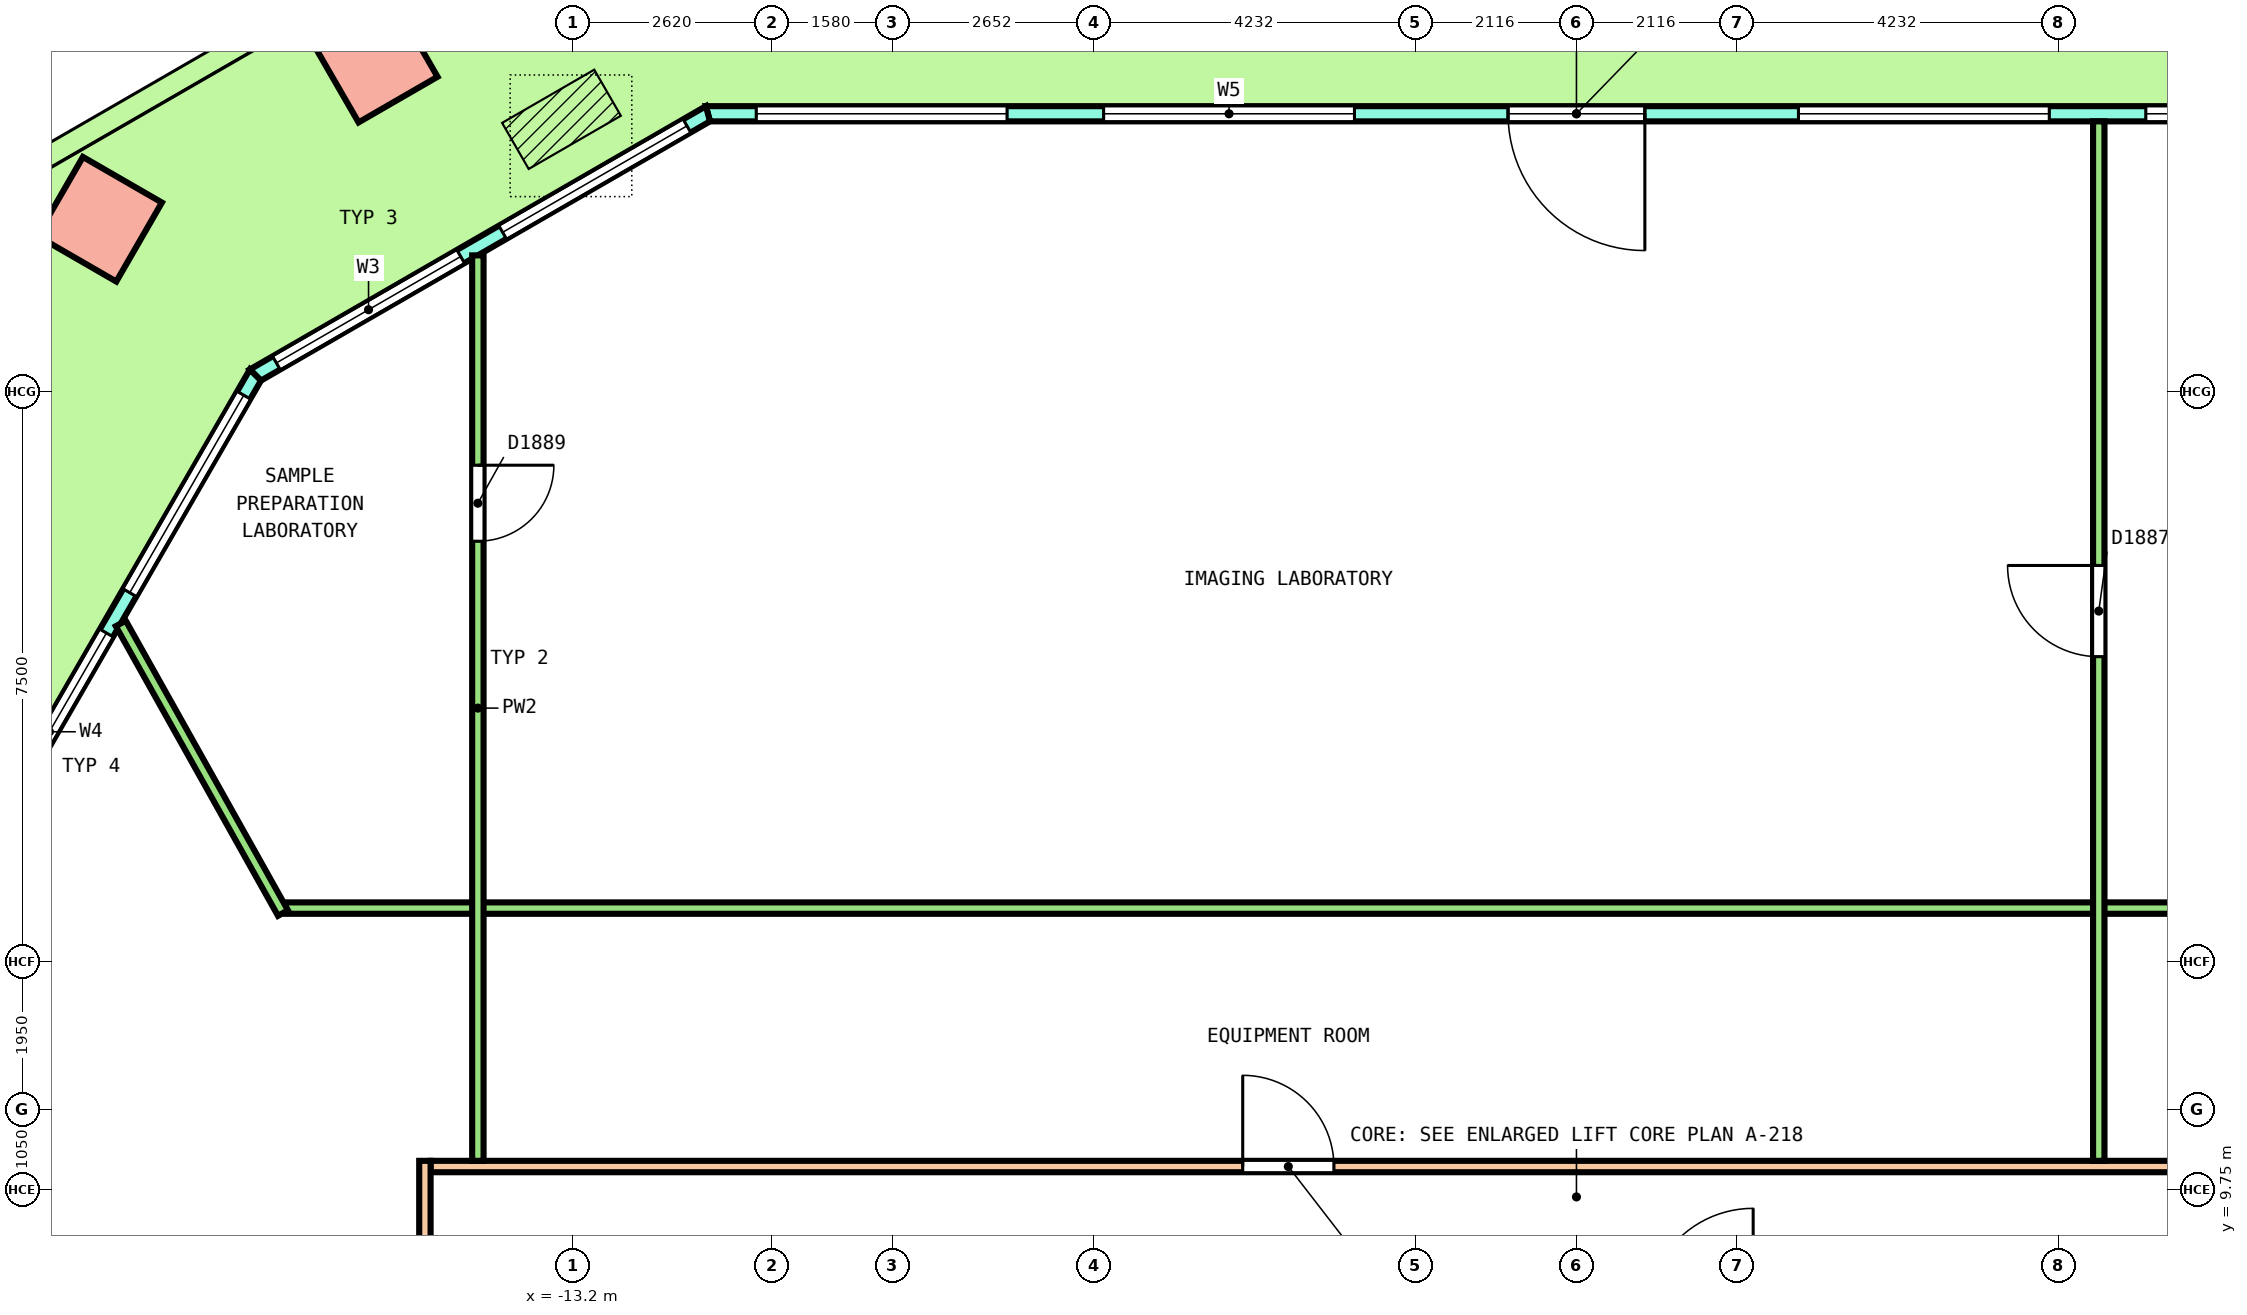
"""IFC4 building model, lengths in metres.
Left out: names, types, materials, properties, quantities, classifications, styles, units other than length and angle.
Written with IfcOpenShell. Run it as: python <this file> out.ifc"""

import sys

from ifc_helpers import new_model, si_unit, direction, frame, frame_2d, origin, origin_2d, place, context, subcontext, project, spatial, polyline, rectangle, outline, extrude, element, fill, save


model = new_model("IFC4")
c1 = context("Model", 3, precision=1e-05, world=origin(), true_north=direction((0.0, 1.0)))
c2 = subcontext(c1, "Body", "Model", "MODEL_VIEW")
j1 = project(units=[si_unit("LENGTHUNIT", "METRE"), si_unit("PLANEANGLEUNIT", "RADIAN")], contexts=[c1])
p1 = place(None, origin())
s1 = spatial("IfcSite", under=j1, at=p1, CompositionType="ELEMENT")
p2 = place(p1, origin())
s2 = spatial("IfcBuilding", under=s1, at=p2, CompositionType="ELEMENT")
p3 = place(p2, frame((0.0, 0.0, 189.2)))
s3 = spatial("IfcBuildingStorey", under=s2, at=p3, CompositionType="ELEMENT", Elevation=189.2)
for number, where, z_axis, x_axis in (
    (1, (-15.803, 24.606, 0.0), (0.0, 0.0, 1.0), (-0.866, -0.5, 0.0)),
    (2, (-19.43, 22.512, 0.0), (0.0, 0.0, 1.0), (-0.5, -0.866, 0.0)),
):
    element("IfcColumn", number, at=place(p3, frame(where, z_axis=z_axis, x_axis=x_axis)), inside=s3, PredefinedType="COLUMN", context=c2, shape_type="SweptSolid", body=[
        extrude(rectangle(XDim=1.2, YDim=1.2, at=origin_2d()), origin(), (0.0, 0.0, 1.0), 4.05),
    ])
p4 = place(p3, frame((11.426, 23.9, 0.0), z_axis=(0.0, 0.0, 1.0), x_axis=(-1.0, 0.0, 0.0)))
e3 = element("IfcWall", 3, at=p4, inside=s3, PredefinedType="SOLIDWALL", context=c2, shape_type="SweptSolid", body=[
    extrude(outline(polyline([(-0.027, -0.1), (1.014, -0.1), (2.055, -0.1), (3.097, -0.1), (4.138, -0.1), (5.179, -0.1), (6.22, -0.1), (7.261, -0.1), (8.303, -0.1), (9.344, -0.1), (10.385, -0.1), (11.426, -0.1), (12.468, -0.1), (13.509, -0.1), (14.55, -0.1), (15.591, -0.1), (16.632, -0.1), (17.673, -0.1), (18.715, -0.1), (19.756, -0.1), (20.797, -0.1), (21.838, -0.1), (22.879, -0.1), (22.826, 0.1), (21.789, 0.1), (20.753, 0.1), (19.717, 0.1), (18.68, 0.1), (17.644, 0.1), (16.608, 0.1), (15.572, 0.1), (14.535, 0.1), (13.499, 0.1), (12.463, 0.1), (11.426, 0.1), (10.39, 0.1), (9.354, 0.1), (8.317, 0.1), (7.281, 0.1), (6.245, 0.1), (5.208, 0.1), (4.172, 0.1), (3.136, 0.1), (2.099, 0.1), (1.063, 0.1), (0.027, 0.1), (-0.027, -0.1)])), origin(), (0.0, 0.0, 1.0), 4.1),
])
p5 = place(p4, frame((0.635, 0.0, 0.1)))
e4 = element("IfcOpeningElement", 4, at=p5, cuts=e3, PredefinedType="OPENING", context=c2, shape_type="SweptSolid", body=[
    extrude(rectangle(XDim=3.3, YDim=2.9, at=frame_2d((1.65, 1.45))), frame((0.0, 0.11, 0.0), z_axis=(0.0, -1.0, 0.0), x_axis=(1.0, 0.0, 0.0)), (0.0, 0.0, 1.0), 0.22),
])
p6 = place(p4, frame((5.206, 0.0, 0.1)))
e5 = element("IfcOpeningElement", 5, at=p6, cuts=e3, PredefinedType="OPENING", context=c2, shape_type="SweptSolid", body=[
    extrude(rectangle(XDim=3.3, YDim=2.9, at=frame_2d((1.65, 1.45))), frame((0.0, 0.11, 0.0), z_axis=(0.0, -1.0, 0.0), x_axis=(1.0, 0.0, 0.0)), (0.0, 0.0, 1.0), 0.22),
])
p7 = place(p4, frame((10.526, 0.0, 0.0)))
e6 = element("IfcOpeningElement", 6, at=p7, cuts=e3, PredefinedType="OPENING", context=c2, shape_type="SweptSolid", body=[
    extrude(rectangle(XDim=1.8, YDim=2.4, at=frame_2d((0.9, 1.2))), frame((0.0, 0.11, 0.0), z_axis=(0.0, -1.0, 0.0), x_axis=(1.0, 0.0, 0.0)), (0.0, 0.0, 1.0), 0.22),
])
p8 = place(p4, frame((10.526, 0.0, 2.55)))
e7 = element("IfcOpeningElement", 7, at=p8, cuts=e3, PredefinedType="OPENING", context=c2, shape_type="SweptSolid", body=[
    extrude(rectangle(XDim=1.8, YDim=0.45, at=frame_2d((0.9, 0.225))), frame((0.0, 0.11, 0.0), z_axis=(0.0, -1.0, 0.0), x_axis=(1.0, 0.0, 0.0)), (0.0, 0.0, 1.0), 0.22),
])
p9 = place(p4, frame((14.347, 0.0, 0.1)))
e8 = element("IfcOpeningElement", 8, at=p9, cuts=e3, PredefinedType="OPENING", context=c2, shape_type="SweptSolid", body=[
    extrude(rectangle(XDim=3.3, YDim=2.9, at=frame_2d((1.65, 1.45))), frame((0.0, 0.11, 0.0), z_axis=(0.0, -1.0, 0.0), x_axis=(1.0, 0.0, 0.0)), (0.0, 0.0, 1.0), 0.22),
])
p10 = place(p4, frame((18.917, 0.0, 0.1)))
e9 = element("IfcOpeningElement", 9, at=p10, cuts=e3, PredefinedType="OPENING", context=c2, shape_type="SweptSolid", body=[
    extrude(rectangle(XDim=3.3, YDim=2.9, at=frame_2d((1.65, 1.45))), frame((0.0, 0.11, 0.0), z_axis=(0.0, -1.0, 0.0), x_axis=(1.0, 0.0, 0.0)), (0.0, 0.0, 1.0), 0.22),
])
p11 = place(p3, frame((-11.426, 23.9, 0.0), z_axis=(0.0, 0.0, 1.0), x_axis=(-0.866029458321, -0.49999297727, 0.0)))
e10 = element("IfcWall", 10, at=p11, inside=s3, PredefinedType="SOLIDWALL", context=c2, shape_type="SweptSolid", body=[
    extrude(outline(polyline([(-0.027, -0.1), (1.128, -0.1), (2.282, -0.1), (3.437, -0.1), (4.592, -0.1), (5.747, -0.1), (6.901, -0.1), (6.848, 0.1), (5.711, 0.1), (4.574, 0.1), (3.437, 0.1), (2.301, 0.1), (1.164, 0.1), (0.027, 0.1), (-0.027, -0.1)])), origin(), (0.0, 0.0, 1.0), 4.1),
])
p12 = place(p11, frame((0.319, 0.0, 0.1)))
e11 = element("IfcOpeningElement", 11, at=p12, cuts=e10, PredefinedType="OPENING", context=c2, shape_type="SweptSolid", body=[
    extrude(rectangle(XDim=2.8, YDim=2.9, at=frame_2d((1.4, 1.45))), frame((0.0, 0.11, 0.0), z_axis=(0.0, -1.0, 0.0), x_axis=(1.0, 0.0, 0.0)), (0.0, 0.0, 1.0), 0.22),
])
p13 = place(p11, frame((3.756, 0.0, 0.1)))
e12 = element("IfcOpeningElement", 12, at=p13, cuts=e10, PredefinedType="OPENING", context=c2, shape_type="SweptSolid", body=[
    extrude(rectangle(XDim=2.8, YDim=2.9, at=frame_2d((1.4, 1.45))), frame((0.0, 0.11, 0.0), z_axis=(0.0, -1.0, 0.0), x_axis=(1.0, 0.0, 0.0)), (0.0, 0.0, 1.0), 0.22),
])
p14 = place(p3, frame((-17.38, 20.463, 0.0), z_axis=(0.0, 0.0, 1.0), x_axis=(-0.500000137386, -0.866025324465, 0.0)))
e13 = element("IfcWall", 13, at=p14, inside=s3, PredefinedType="SOLIDWALL", context=c2, shape_type="SweptSolid", body=[
    extrude(outline(polyline([(-0.027, -0.1), (0.979, -0.1), (1.986, -0.1), (2.992, -0.1), (3.999, -0.1), (5.005, -0.1), (6.012, -0.1), (7.018, -0.1), (8.025, -0.1), (9.031, -0.1), (10.038, -0.1), (11.044, -0.1), (12.051, -0.1), (13.057, -0.1), (14.063, -0.1), (15.07, -0.1), (16.076, -0.1), (17.083, -0.1), (18.089, -0.1), (18.036, 0.1), (17.035, 0.1), (16.035, 0.1), (15.034, 0.1), (14.034, 0.1), (13.033, 0.1), (12.033, 0.1), (11.032, 0.1), (10.032, 0.1), (9.031, 0.1), (8.031, 0.1), (7.03, 0.1), (6.03, 0.1), (5.029, 0.1), (4.029, 0.1), (3.028, 0.1), (2.028, 0.1), (1.027, 0.1), (0.027, 0.1), (-0.027, -0.1)])), origin(), (0.0, 0.0, 1.0), 4.1),
])
p15 = place(p14, frame((0.306, 0.0, 0.1)))
e14 = element("IfcOpeningElement", 14, at=p15, cuts=e13, PredefinedType="OPENING", context=c2, shape_type="SweptSolid", body=[
    extrude(rectangle(XDim=3.0, YDim=2.9, at=frame_2d((1.5, 1.45))), frame((0.0, 0.11, 0.0), z_axis=(0.0, -1.0, 0.0), x_axis=(1.0, 0.0, 0.0)), (0.0, 0.0, 1.0), 0.22),
])
p16 = place(p14, frame((3.919, 0.0, 0.1)))
e15 = element("IfcOpeningElement", 15, at=p16, cuts=e13, PredefinedType="OPENING", context=c2, shape_type="SweptSolid", body=[
    extrude(rectangle(XDim=3.0, YDim=2.9, at=frame_2d((1.5, 1.45))), frame((0.0, 0.11, 0.0), z_axis=(0.0, -1.0, 0.0), x_axis=(1.0, 0.0, 0.0)), (0.0, 0.0, 1.0), 0.22),
])
p17 = place(p14, frame((8.131, 0.0, 0.0)))
e16 = element("IfcOpeningElement", 16, at=p17, cuts=e13, PredefinedType="OPENING", context=c2, shape_type="SweptSolid", body=[
    extrude(rectangle(XDim=1.8, YDim=2.4, at=frame_2d((0.9, 1.2))), frame((0.0, 0.11, 0.0), z_axis=(0.0, -1.0, 0.0), x_axis=(1.0, 0.0, 0.0)), (0.0, 0.0, 1.0), 0.22),
])
p18 = place(p14, frame((8.131, 0.0, 2.55)))
e17 = element("IfcOpeningElement", 17, at=p18, cuts=e13, PredefinedType="OPENING", context=c2, shape_type="SweptSolid", body=[
    extrude(rectangle(XDim=1.8, YDim=0.45, at=frame_2d((0.9, 0.225))), frame((0.0, 0.11, 0.0), z_axis=(0.0, -1.0, 0.0), x_axis=(1.0, 0.0, 0.0)), (0.0, 0.0, 1.0), 0.22),
])
p19 = place(p14, frame((11.144, 0.0, 0.1)))
e18 = element("IfcOpeningElement", 18, at=p19, cuts=e13, PredefinedType="OPENING", context=c2, shape_type="SweptSolid", body=[
    extrude(rectangle(XDim=3.0, YDim=2.9, at=frame_2d((1.5, 1.45))), frame((0.0, 0.11, 0.0), z_axis=(0.0, -1.0, 0.0), x_axis=(1.0, 0.0, 0.0)), (0.0, 0.0, 1.0), 0.22),
])
p20 = place(p14, frame((14.756, 0.0, 0.1)))
e19 = element("IfcOpeningElement", 19, at=p20, cuts=e13, PredefinedType="OPENING", context=c2, shape_type="SweptSolid", body=[
    extrude(rectangle(XDim=3.0, YDim=2.9, at=frame_2d((1.5, 1.45))), frame((0.0, 0.11, 0.0), z_axis=(0.0, -1.0, 0.0), x_axis=(1.0, 0.0, 0.0)), (0.0, 0.0, 1.0), 0.22),
])
p21 = place(p3, frame((-15.075, 10.05, 0.0), z_axis=(0.0, 0.0, 1.0), x_axis=(1.0, 0.0, 0.0)))
e20 = element("IfcWall", 20, at=p21, inside=s3, PredefinedType="PARTITIONING", context=c2, shape_type="SweptSolid", body=[
    extrude(rectangle(XDim=30.15, YDim=0.15, at=frame_2d((15.075, 0.0))), origin(), (0.0, 0.0, 1.0), 3.05),
])
p22 = place(p21, frame((26.573, 0.0, 0.0)))
e21 = element("IfcOpeningElement", 21, at=p22, cuts=e20, PredefinedType="OPENING", context=c2, shape_type="SweptSolid", body=[
    extrude(rectangle(XDim=1.0, YDim=2.1, at=frame_2d((0.5, 1.05))), frame((0.0, 0.085, 0.0), z_axis=(0.0, -1.0, 0.0), x_axis=(1.0, 0.0, 0.0)), (0.0, 0.0, 1.0), 0.17),
])
p23 = place(p21, frame((10.684, 0.0, 0.0)))
e22 = element("IfcOpeningElement", 22, at=p23, cuts=e20, PredefinedType="OPENING", context=c2, shape_type="SweptSolid", body=[
    extrude(rectangle(XDim=1.2, YDim=2.1, at=frame_2d((0.6, 1.05))), frame((0.0, 0.085, 0.0), z_axis=(0.0, -1.0, 0.0), x_axis=(1.0, 0.0, 0.0)), (0.0, 0.0, 1.0), 0.17),
])
p24 = place(p3, frame((-15.15, 0.576, 0.0), z_axis=(0.0, 0.0, 1.0), x_axis=(0.0, 1.0, 0.0)))
e23 = element("IfcWall", 23, at=p24, inside=s3, PredefinedType="PARTITIONING", context=c2, shape_type="SweptSolid", body=[
    extrude(rectangle(XDim=9.549, YDim=0.15, at=frame_2d((4.775, 0.0))), origin(), (0.0, 0.0, 1.0), 3.05),
])
p25 = place(p3, frame((-16.979, 13.45, 0.0), z_axis=(0.0, 0.0, 1.0), x_axis=(1.0, 0.0, 0.0)))
e24 = element("IfcWall", 24, at=p25, inside=s3, PredefinedType="PARTITIONING", context=c2, shape_type="SweptSolid", body=[
    extrude(rectangle(XDim=35.454, YDim=0.15, at=frame_2d((17.727, 0.0))), origin(), (0.0, 0.0, 1.0), 3.05),
])
p26 = place(p25, frame((27.623, 0.0, 0.0)))
e25 = element("IfcOpeningElement", 25, at=p26, cuts=e24, PredefinedType="OPENING", context=c2, shape_type="SweptSolid", body=[
    extrude(rectangle(XDim=1.2, YDim=2.1, at=frame_2d((0.6, 1.05))), frame((0.0, 0.085, 0.0), z_axis=(0.0, -1.0, 0.0), x_axis=(1.0, 0.0, 0.0)), (0.0, 0.0, 1.0), 0.17),
])
p27 = place(p3, frame((6.872, 10.125, 0.0), z_axis=(0.0, 0.0, 1.0), x_axis=(0.0, 1.0, 0.0)))
e26 = element("IfcWall", 26, at=p27, inside=s3, PredefinedType="PARTITIONING", context=c2, shape_type="SweptSolid", body=[
    extrude(rectangle(XDim=13.675, YDim=0.15, at=frame_2d((6.837, 0.0))), origin(), (0.0, 0.0, 1.0), 3.05),
])
p28 = place(p27, frame((6.633, 0.0, 0.0)))
e27 = element("IfcOpeningElement", 27, at=p28, cuts=e26, PredefinedType="OPENING", context=c2, shape_type="SweptSolid", body=[
    extrude(rectangle(XDim=1.2, YDim=2.1, at=frame_2d((0.6, 1.05))), frame((0.0, 0.085, 0.0), z_axis=(0.0, -1.0, 0.0), x_axis=(1.0, 0.0, 0.0)), (0.0, 0.0, 1.0), 0.17),
])
p29 = place(p3, frame((-14.453, 10.125, 0.0), z_axis=(0.0, 0.0, 1.0), x_axis=(0.0, 1.0, 0.0)))
e28 = element("IfcWall", 28, at=p29, inside=s3, PredefinedType="PARTITIONING", context=c2, shape_type="SweptSolid", body=[
    extrude(rectangle(XDim=11.912, YDim=0.15, at=frame_2d((5.956, 0.0))), origin(), (0.0, 0.0, 1.0), 3.05),
])
p30 = place(p29, frame((8.152, 0.0, 0.0)))
e29 = element("IfcOpeningElement", 29, at=p30, cuts=e28, PredefinedType="OPENING", context=c2, shape_type="SweptSolid", body=[
    extrude(rectangle(XDim=1.0, YDim=2.1, at=frame_2d((0.5, 1.05))), frame((0.0, 0.085, 0.0), z_axis=(0.0, -1.0, 0.0), x_axis=(1.0, 0.0, 0.0)), (0.0, 0.0, 1.0), 0.17),
])
p31 = place(p3, frame((-19.151, 17.195, 0.0), z_axis=(0.0, 0.0, 1.0), x_axis=(0.48858294178, -0.872517454841, 0.0)))
e30 = element("IfcWall", 30, at=p31, inside=s3, PredefinedType="PARTITIONING", context=c2, shape_type="SweptSolid", body=[
    extrude(rectangle(XDim=4.367, YDim=0.15, at=frame_2d((2.184, 0.0))), origin(), (0.0, 0.0, 1.0), 3.05),
])
p32 = place(p5, origin())
e31 = element("IfcWindow", 31, at=p32, inside=s3, PartitioningType="SINGLE_PANEL", PredefinedType="WINDOW", context=c2, shape_type="SweptSolid", body=[
    extrude(rectangle(XDim=3.3, YDim=2.9, at=frame_2d((1.65, 1.45))), frame((0.0, 0.03, 0.0), z_axis=(0.0, -1.0, 0.0), x_axis=(1.0, 0.0, 0.0)), (0.0, 0.0, 1.0), 0.06),
])
fill(e4, e31)
p33 = place(p6, origin())
e32 = element("IfcWindow", 32, at=p33, inside=s3, PartitioningType="SINGLE_PANEL", PredefinedType="WINDOW", context=c2, shape_type="SweptSolid", body=[
    extrude(rectangle(XDim=3.3, YDim=2.9, at=frame_2d((1.65, 1.45))), frame((0.0, 0.03, 0.0), z_axis=(0.0, -1.0, 0.0), x_axis=(1.0, 0.0, 0.0)), (0.0, 0.0, 1.0), 0.06),
])
fill(e5, e32)
p34 = place(p7, origin())
e33 = element("IfcDoor", 33, at=p34, inside=s3, OperationType="DOUBLE_DOOR_SINGLE_SWING", PredefinedType="DOOR", context=c2, shape_type="SweptSolid", body=[
    extrude(rectangle(XDim=1.8, YDim=2.4, at=frame_2d((0.9, 1.2))), frame((0.0, 0.025, 0.0), z_axis=(0.0, -1.0, 0.0), x_axis=(1.0, 0.0, 0.0)), (0.0, 0.0, 1.0), 0.05),
])
fill(e6, e33)
p35 = place(p8, origin())
e34 = element("IfcWindow", 34, at=p35, inside=s3, PartitioningType="SINGLE_PANEL", PredefinedType="WINDOW", context=c2, shape_type="SweptSolid", body=[
    extrude(rectangle(XDim=1.8, YDim=0.45, at=frame_2d((0.9, 0.225))), frame((0.0, 0.03, 0.0), z_axis=(0.0, -1.0, 0.0), x_axis=(1.0, 0.0, 0.0)), (0.0, 0.0, 1.0), 0.06),
])
fill(e7, e34)
p36 = place(p9, origin())
e35 = element("IfcWindow", 35, at=p36, inside=s3, PartitioningType="SINGLE_PANEL", PredefinedType="WINDOW", context=c2, shape_type="SweptSolid", body=[
    extrude(rectangle(XDim=3.3, YDim=2.9, at=frame_2d((1.65, 1.45))), frame((0.0, 0.03, 0.0), z_axis=(0.0, -1.0, 0.0), x_axis=(1.0, 0.0, 0.0)), (0.0, 0.0, 1.0), 0.06),
])
fill(e8, e35)
p37 = place(p10, origin())
e36 = element("IfcWindow", 36, at=p37, inside=s3, PartitioningType="SINGLE_PANEL", PredefinedType="WINDOW", context=c2, shape_type="SweptSolid", body=[
    extrude(rectangle(XDim=3.3, YDim=2.9, at=frame_2d((1.65, 1.45))), frame((0.0, 0.03, 0.0), z_axis=(0.0, -1.0, 0.0), x_axis=(1.0, 0.0, 0.0)), (0.0, 0.0, 1.0), 0.06),
])
fill(e9, e36)
p38 = place(p12, origin())
e37 = element("IfcWindow", 37, at=p38, inside=s3, PartitioningType="SINGLE_PANEL", PredefinedType="WINDOW", context=c2, shape_type="SweptSolid", body=[
    extrude(rectangle(XDim=2.8, YDim=2.9, at=frame_2d((1.4, 1.45))), frame((0.0, 0.03, 0.0), z_axis=(0.0, -1.0, 0.0), x_axis=(1.0, 0.0, 0.0)), (0.0, 0.0, 1.0), 0.06),
])
fill(e11, e37)
p39 = place(p13, origin())
e38 = element("IfcWindow", 38, at=p39, inside=s3, PartitioningType="SINGLE_PANEL", PredefinedType="WINDOW", context=c2, shape_type="SweptSolid", body=[
    extrude(rectangle(XDim=2.8, YDim=2.9, at=frame_2d((1.4, 1.45))), frame((0.0, 0.03, 0.0), z_axis=(0.0, -1.0, 0.0), x_axis=(1.0, 0.0, 0.0)), (0.0, 0.0, 1.0), 0.06),
])
fill(e12, e38)
p40 = place(p15, origin())
e39 = element("IfcWindow", 39, at=p40, inside=s3, PartitioningType="SINGLE_PANEL", PredefinedType="WINDOW", context=c2, shape_type="SweptSolid", body=[
    extrude(rectangle(XDim=3.0, YDim=2.9, at=frame_2d((1.5, 1.45))), frame((0.0, 0.03, 0.0), z_axis=(0.0, -1.0, 0.0), x_axis=(1.0, 0.0, 0.0)), (0.0, 0.0, 1.0), 0.06),
])
fill(e14, e39)
p41 = place(p16, origin())
e40 = element("IfcWindow", 40, at=p41, inside=s3, PartitioningType="SINGLE_PANEL", PredefinedType="WINDOW", context=c2, shape_type="SweptSolid", body=[
    extrude(rectangle(XDim=3.0, YDim=2.9, at=frame_2d((1.5, 1.45))), frame((0.0, 0.03, 0.0), z_axis=(0.0, -1.0, 0.0), x_axis=(1.0, 0.0, 0.0)), (0.0, 0.0, 1.0), 0.06),
])
fill(e15, e40)
p42 = place(p28, origin())
e41 = element("IfcDoor", 41, at=p42, inside=s3, OperationType="DOUBLE_DOOR_SINGLE_SWING", PredefinedType="DOOR", context=c2, shape_type="SweptSolid", body=[
    extrude(rectangle(XDim=1.2, YDim=2.1, at=frame_2d((0.6, 1.05))), frame((0.0, 0.025, 0.0), z_axis=(0.0, -1.0, 0.0), x_axis=(1.0, 0.0, 0.0)), (0.0, 0.0, 1.0), 0.05),
])
fill(e27, e41)
p43 = place(p23, origin())
e42 = element("IfcDoor", 42, at=p43, inside=s3, OperationType="DOUBLE_DOOR_SINGLE_SWING", PredefinedType="DOOR", context=c2, shape_type="SweptSolid", body=[
    extrude(rectangle(XDim=1.2, YDim=2.1, at=frame_2d((0.6, 1.05))), frame((0.0, 0.025, 0.0), z_axis=(0.0, -1.0, 0.0), x_axis=(1.0, 0.0, 0.0)), (0.0, 0.0, 1.0), 0.05),
])
fill(e22, e42)
p44 = place(p30, origin())
e43 = element("IfcDoor", 43, at=p44, inside=s3, OperationType="SINGLE_SWING_LEFT", PredefinedType="DOOR", context=c2, shape_type="SweptSolid", body=[
    extrude(rectangle(XDim=1.0, YDim=2.1, at=frame_2d((0.5, 1.05))), frame((0.0, 0.025, 0.0), z_axis=(0.0, -1.0, 0.0), x_axis=(1.0, 0.0, 0.0)), (0.0, 0.0, 1.0), 0.05),
])
fill(e29, e43)
save(model, sys.argv[1])
